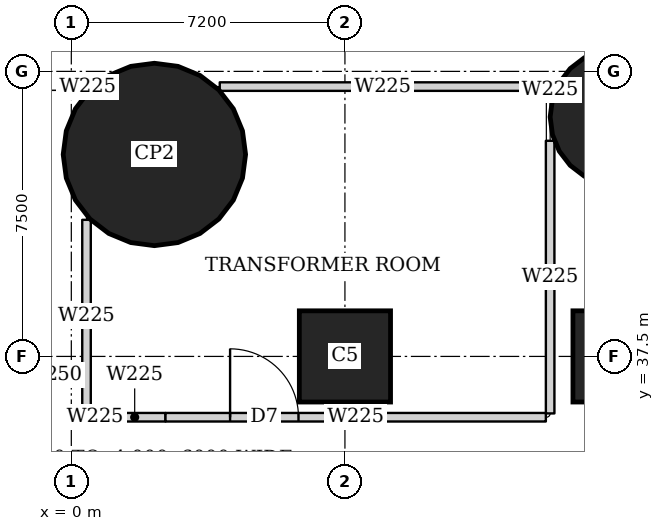
"""IFC4 building model, lengths in metres.
Left out: names, types, materials, properties, quantities, classifications, styles, units other than length and angle.
Written with IfcOpenShell. Run it as: python <this file> out.ifc"""

import sys

from ifc_helpers import new_model, si_unit, direction, frame, frame_2d, origin, origin_2d, place, context, subcontext, project, spatial, rectangle, circle, extrude, element, fill, save


model = new_model("IFC4")
c1 = context("Model", 3, precision=1e-05, world=origin(), true_north=direction((0.0, 1.0)))
c2 = subcontext(c1, "Body", "Model", "MODEL_VIEW")
j1 = project(units=[si_unit("LENGTHUNIT", "METRE"), si_unit("PLANEANGLEUNIT", "RADIAN")], contexts=[c1])
p1 = place(None, origin())
s1 = spatial("IfcSite", under=j1, at=p1, CompositionType="ELEMENT")
p2 = place(p1, origin())
s2 = spatial("IfcBuilding", under=s1, at=p2, CompositionType="ELEMENT")
p3 = place(p2, frame((0.0, 0.0, -4.0)))
s3 = spatial("IfcBuildingStorey", under=s2, at=p3, CompositionType="ELEMENT", Elevation=-4.0)
for number, where, z_axis, x_axis in (
    (1, (7.2, 37.5, 0.0), (0.0, 0.0, 1.0), (1.0, 0.0, 0.0)),
    (2, (14.4, 37.5, 0.0), (0.0, 0.0, 1.0), (1.0, 0.0, 0.0)),
):
    element("IfcColumn", number, at=place(p3, frame(where, z_axis=z_axis, x_axis=x_axis)), inside=s3, PredefinedType="COLUMN", context=c2, shape_type="SweptSolid", body=[
        extrude(rectangle(XDim=2.4, YDim=2.4, at=origin_2d()), origin(), (0.0, 0.0, 1.0), 4.0),
    ])
p4 = place(p3, frame((2.186, 42.814, 0.0), z_axis=(0.0, 0.0, 1.0), x_axis=(1.0, 0.0, 0.0)))
e3 = element("IfcColumn", 3, at=p4, inside=s3, PredefinedType="COLUMN", context=c2, shape_type="SweptSolid", body=[
    extrude(circle(Radius=2.4, at=origin_2d()), origin(), (0.0, 0.0, 1.0), 4.0),
])
p5 = place(p3, frame((14.4, 43.8, 0.0), z_axis=(0.0, 0.0, 1.0), x_axis=(1.0, 0.0, 0.0)))
e4 = element("IfcColumn", 4, at=p5, inside=s3, PredefinedType="COLUMN", context=c2, shape_type="SweptSolid", body=[
    extrude(circle(Radius=1.8, at=origin_2d()), origin(), (0.0, 0.0, 1.0), 4.0),
])
p6 = place(p3, frame((0.4, 35.9, 0.0), z_axis=(0.0, 0.0, 1.0), x_axis=(1.0, 0.0, 0.0)))
e5 = element("IfcWall", 5, at=p6, inside=s3, PredefinedType="SOLIDWALL", context=c2, shape_type="SweptSolid", body=[
    extrude(rectangle(XDim=0.457, YDim=0.225, at=frame_2d((0.229, 0.0))), origin(), (0.0, 0.0, 1.0), 3.7),
])
p7 = place(p3, frame((0.857, 35.9, 0.0), z_axis=(0.0, 0.0, 1.0), x_axis=(1.0, 0.0, 0.0)))
e6 = element("IfcWall", 6, at=p7, inside=s3, PredefinedType="SOLIDWALL", context=c2, shape_type="SweptSolid", body=[
    extrude(rectangle(XDim=1.621, YDim=0.225, at=frame_2d((0.811, 0.0))), origin(), (0.0, 0.0, 1.0), 2.2),
])
p8 = place(p3, frame((2.478, 35.9, 0.0), z_axis=(0.0, 0.0, 1.0), x_axis=(1.0, 0.0, 0.0)))
e7 = element("IfcWall", 7, at=p8, inside=s3, PredefinedType="SOLIDWALL", context=c2, shape_type="SweptSolid", body=[
    extrude(rectangle(XDim=10.009, YDim=0.225, at=frame_2d((5.004, 0.0))), origin(), (0.0, 0.0, 1.0), 3.7),
])
p9 = place(p8, frame((1.7, 0.0, 0.0)))
e8 = element("IfcOpeningElement", 8, at=p9, cuts=e7, PredefinedType="OPENING", context=c2, shape_type="SweptSolid", body=[
    extrude(rectangle(XDim=1.8, YDim=2.4, at=frame_2d((0.9, 1.2))), frame((0.0, 0.123, 0.0), z_axis=(0.0, -1.0, 0.0), x_axis=(1.0, 0.0, 0.0)), (0.0, 0.0, 1.0), 0.245),
])
p10 = place(p3, frame((0.4, 36.012, 0.0), z_axis=(0.0, 0.0, 1.0), x_axis=(0.0, 1.0, 0.0)))
e9 = element("IfcWall", 9, at=p10, inside=s3, PredefinedType="SOLIDWALL", context=c2, shape_type="SweptSolid", body=[
    extrude(rectangle(XDim=5.082, YDim=0.225, at=frame_2d((2.541, 0.0))), origin(), (0.0, 0.0, 1.0), 3.7),
])
p11 = place(p3, frame((12.6, 36.0, 0.0), z_axis=(0.0, 0.0, 1.0), x_axis=(0.0, 1.0, 0.0)))
e10 = element("IfcWall", 10, at=p11, inside=s3, PredefinedType="SOLIDWALL", context=c2, shape_type="SweptSolid", body=[
    extrude(rectangle(XDim=7.174, YDim=0.225, at=frame_2d((3.587, 0.0))), origin(), (0.0, 0.0, 1.0), 2.2),
])
p12 = place(p3, frame((12.6, 44.426, 0.0), z_axis=(0.0, 0.0, 1.0), x_axis=(0.0, 1.0, 0.0)))
e11 = element("IfcWall", 11, at=p12, inside=s3, PredefinedType="SOLIDWALL", context=c2, shape_type="SweptSolid", body=[
    extrude(rectangle(XDim=0.174, YDim=0.225, at=frame_2d((0.087, 0.0))), origin(), (0.0, 0.0, 1.0), 2.2),
])
p13 = place(p3, frame((0.4, 44.6, 0.0), z_axis=(0.0, 0.0, 1.0), x_axis=(1.0, 0.0, 0.0)))
e12 = element("IfcWall", 12, at=p13, inside=s3, PredefinedType="SOLIDWALL", context=c2, shape_type="SweptSolid", body=[
    extrude(rectangle(XDim=0.066, YDim=0.225, at=frame_2d((0.033, 0.0))), origin(), (0.0, 0.0, 1.0), 3.7),
])
p14 = place(p3, frame((3.906, 44.6, 0.0), z_axis=(0.0, 0.0, 1.0), x_axis=(1.0, 0.0, 0.0)))
e13 = element("IfcWall", 13, at=p14, inside=s3, PredefinedType="SOLIDWALL", context=c2, shape_type="SweptSolid", body=[
    extrude(rectangle(XDim=8.581, YDim=0.225, at=frame_2d((4.291, 0.0))), origin(), (0.0, 0.0, 1.0), 3.7),
])
p15 = place(p9, origin())
e14 = element("IfcDoor", 14, at=p15, inside=s3, OperationType="DOUBLE_DOOR_SINGLE_SWING", PredefinedType="DOOR", context=c2, shape_type="SweptSolid", body=[
    extrude(rectangle(XDim=1.8, YDim=2.4, at=frame_2d((0.9, 1.2))), frame((0.0, 0.025, 0.0), z_axis=(0.0, -1.0, 0.0), x_axis=(1.0, 0.0, 0.0)), (0.0, 0.0, 1.0), 0.05),
])
fill(e8, e14)
save(model, sys.argv[1])
